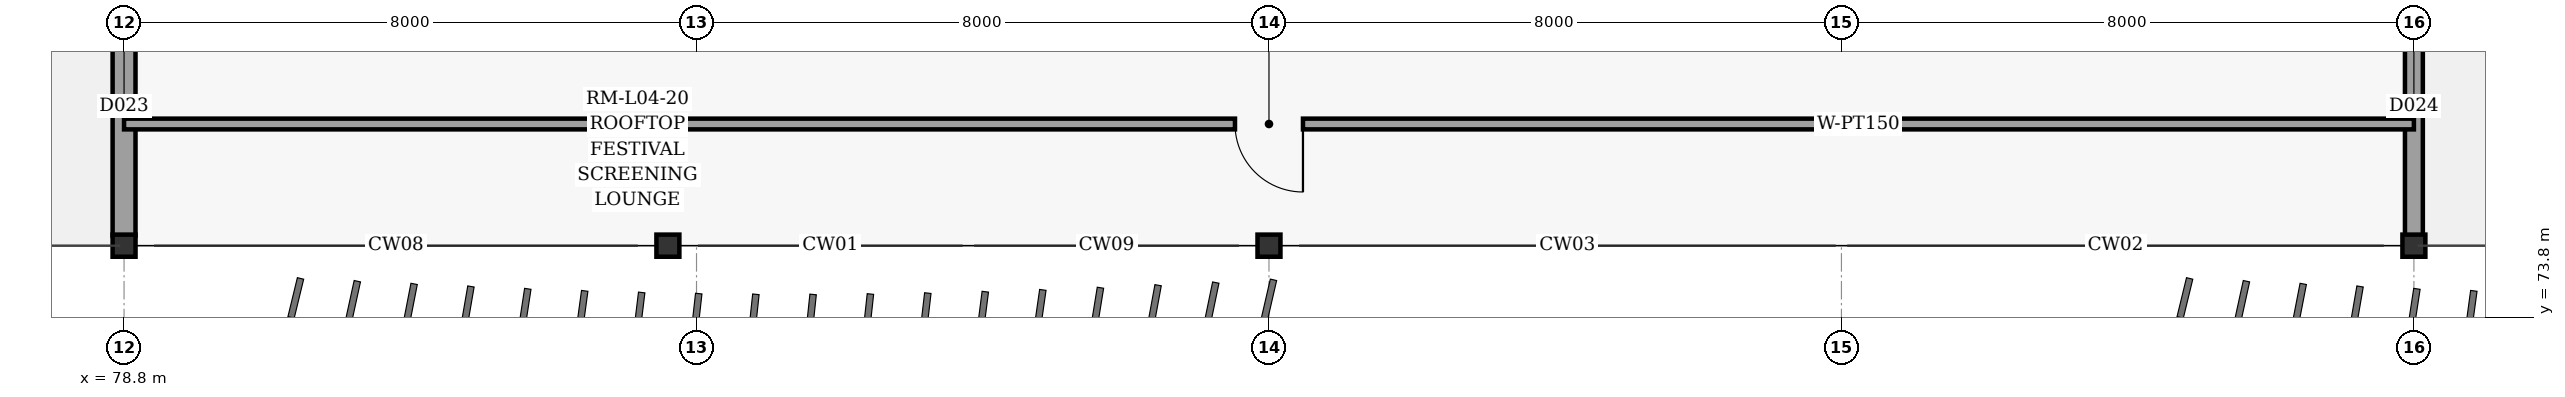
"""IFC4 building model, lengths in metres.
Left out: names, types, materials, properties, quantities, classifications, styles, units other than length and angle.
Written with IfcOpenShell. Run it as: python <this file> out.ifc"""

import sys

from ifc_helpers import new_model, si_unit, direction, frame, frame_2d, origin, origin_2d, place, context, subcontext, project, spatial, rectangle, i_section, extrude, element, fill, save


model = new_model("IFC4")
c1 = context("Model", 3, precision=1e-05, world=origin(), true_north=direction((0.0, 1.0)))
c2 = subcontext(c1, "Body", "Model", "MODEL_VIEW")
j1 = project(units=[si_unit("LENGTHUNIT", "METRE"), si_unit("PLANEANGLEUNIT", "RADIAN")], contexts=[c1])
p1 = place(None, origin())
s1 = spatial("IfcSite", under=j1, at=p1, CompositionType="ELEMENT")
p2 = place(p1, origin())
s2 = spatial("IfcBuilding", under=s1, at=p2, CompositionType="ELEMENT")
p3 = place(p2, frame((0.0, 0.0, 20.4)))
s3 = spatial("IfcBuildingStorey", under=s2, at=p3, CompositionType="ELEMENT", Elevation=20.4)
for number, where, z_axis, x_axis in (
    (1, (78.8, 74.8, 0.0), (0.0, 0.0, 1.0), (1.0, 0.0, 0.0)),
    (2, (86.4, 74.8, 0.0), (0.0, 0.0, 1.0), (1.0, 0.0, 0.0)),
    (3, (94.8, 74.8, 0.0), (0.0, 0.0, 1.0), (1.0, 0.0, 0.0)),
    (4, (110.8, 74.8, 0.0), (0.0, 0.0, 1.0), (1.0, 0.0, 0.0)),
):
    element("IfcColumn", number, at=place(p3, frame(where, z_axis=z_axis, x_axis=x_axis)), inside=s3, PredefinedType="COLUMN", context=c2, shape_type="SweptSolid", body=[
        extrude(i_section(OverallWidth=0.309, OverallDepth=0.321, WebThickness=0.014, FlangeThickness=0.022, at=origin_2d()), origin(), (0.0, 0.0, 1.0), 4.5),
    ])
p4 = place(p3, frame((110.8, 87.46, 0.0), z_axis=(0.0, 0.0, 1.0), x_axis=(0.0, -1.0, 0.0)))
e5 = element("IfcWall", 5, at=p4, inside=s3, PredefinedType="SOLIDWALL", context=c2, shape_type="SweptSolid", body=[
    extrude(rectangle(XDim=12.52, YDim=0.25, at=frame_2d((6.26, 0.0))), origin(), (0.0, 0.0, 1.0), 3.773),
])
p5 = place(p4, frame((8.66, 0.0, 0.0)))
e6 = element("IfcOpeningElement", 6, at=p5, cuts=e5, PredefinedType="OPENING", context=c2, shape_type="SweptSolid", body=[
    extrude(rectangle(XDim=1.2, YDim=2.2, at=frame_2d((0.6, 1.1))), frame((0.0, 0.135, 0.0), z_axis=(0.0, -1.0, 0.0), x_axis=(1.0, 0.0, 0.0)), (0.0, 0.0, 1.0), 0.27),
])
p6 = place(p4, frame((2.2, 0.0, 0.8)))
e7 = element("IfcOpeningElement", 7, at=p6, cuts=e5, PredefinedType="OPENING", context=c2, shape_type="SweptSolid", body=[
    extrude(rectangle(XDim=2.2, YDim=2.25, at=frame_2d((1.1, 1.125))), frame((0.0, 0.135, 0.0), z_axis=(0.0, -1.0, 0.0), x_axis=(1.0, 0.0, 0.0)), (0.0, 0.0, 1.0), 0.27),
])
p7 = place(p3, frame((78.8, 74.94, 0.0), z_axis=(0.0, 0.0, 1.0), x_axis=(0.0, 1.0, 0.0)))
e8 = element("IfcWall", 8, at=p7, inside=s3, PredefinedType="SOLIDWALL", context=c2, shape_type="SweptSolid", body=[
    extrude(rectangle(XDim=12.52, YDim=0.32, at=frame_2d((6.26, 0.0))), origin(), (0.0, 0.0, 1.0), 3.773),
])
p8 = place(p7, frame((2.66, 0.0, 0.0)))
e9 = element("IfcOpeningElement", 9, at=p8, cuts=e8, PredefinedType="OPENING", context=c2, shape_type="SweptSolid", body=[
    extrude(rectangle(XDim=1.2, YDim=2.2, at=frame_2d((0.6, 1.1))), frame((0.0, 0.17, 0.0), z_axis=(0.0, -1.0, 0.0), x_axis=(1.0, 0.0, 0.0)), (0.0, 0.0, 1.0), 0.34),
])
p9 = place(p3, frame((110.8, 76.5, 0.0), z_axis=(0.0, 0.0, 1.0), x_axis=(-1.0, 0.0, 0.0)))
e10 = element("IfcWall", 10, at=p9, inside=s3, PredefinedType="PARTITIONING", context=c2, shape_type="SweptSolid", body=[
    extrude(rectangle(XDim=32.0, YDim=0.15, at=frame_2d((16.0, 0.0))), origin(), (0.0, 0.0, 1.0), 4.255),
])
p10 = place(p9, frame((15.525, 0.0, 0.0)))
e11 = element("IfcOpeningElement", 11, at=p10, cuts=e10, PredefinedType="OPENING", context=c2, shape_type="SweptSolid", body=[
    extrude(rectangle(XDim=0.95, YDim=2.1, at=frame_2d((0.475, 1.05))), frame((0.0, 0.085, 0.0), z_axis=(0.0, -1.0, 0.0), x_axis=(1.0, 0.0, 0.0)), (0.0, 0.0, 1.0), 0.17),
])
p11 = place(p10, origin())
e12 = element("IfcDoor", 12, at=p11, inside=s3, OperationType="SINGLE_SWING_LEFT", PredefinedType="DOOR", context=c2, shape_type="SweptSolid", body=[
    extrude(rectangle(XDim=0.95, YDim=2.1, at=frame_2d((0.475, 1.05))), frame((0.0, 0.025, 0.0), z_axis=(0.0, -1.0, 0.0), x_axis=(1.0, 0.0, 0.0)), (0.0, 0.0, 1.0), 0.05),
])
fill(e11, e12)
save(model, sys.argv[1])
